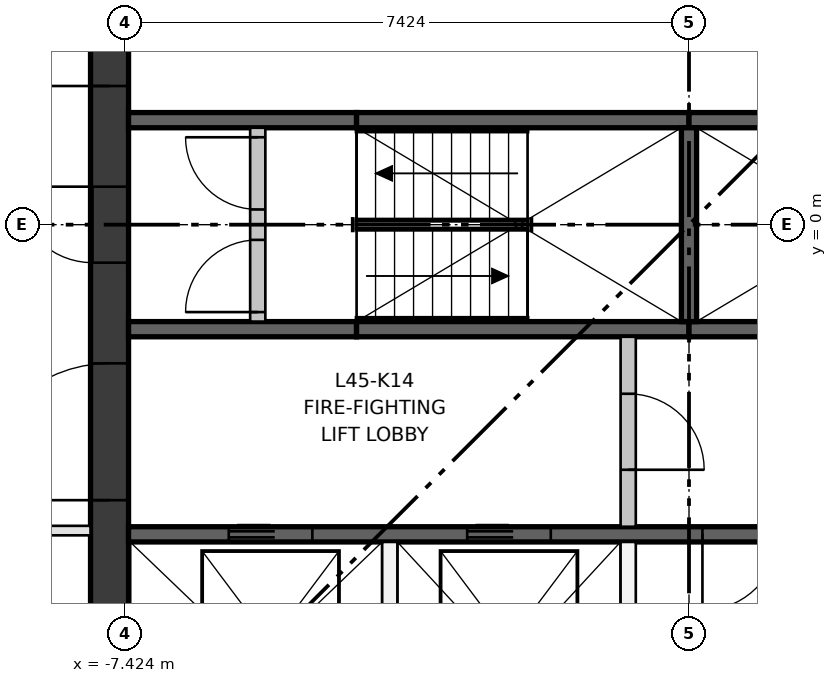
"""IFC4 building model, lengths in metres.
Left out: names, types, materials, properties, quantities, classifications, styles, units other than length and angle.
Written with IfcOpenShell. Run it as: python <this file> out.ifc"""

import sys

from ifc_helpers import new_model, si_unit, direction, frame, frame_2d, origin, place, context, subcontext, project, spatial, rectangle, extrude, element, fill, save


model = new_model("IFC4")
c1 = context("Model", 3, precision=1e-05, world=origin(), true_north=direction((0.0, 1.0)))
c2 = subcontext(c1, "Body", "Model", "MODEL_VIEW")
j1 = project(units=[si_unit("LENGTHUNIT", "METRE"), si_unit("PLANEANGLEUNIT", "RADIAN")], contexts=[c1])
p1 = place(None, origin())
s1 = spatial("IfcSite", under=j1, at=p1, CompositionType="ELEMENT")
p2 = place(p1, origin())
s2 = spatial("IfcBuilding", under=s1, at=p2, CompositionType="ELEMENT")
p3 = place(p2, frame((0.0, 0.0, 170.9)))
s3 = spatial("IfcBuildingStorey", under=s2, at=p3, CompositionType="ELEMENT", Elevation=170.9)
p4 = place(p3, frame((-7.624, -7.374, 0.0), z_axis=(0.0, 0.0, 1.0), x_axis=(0.0, 1.0, 0.0)))
e1 = element("IfcWall", 1, at=p4, inside=s3, PredefinedType="SHEAR", context=c2, shape_type="SweptSolid", body=[
    extrude(rectangle(XDim=14.748, YDim=0.5, at=frame_2d((7.374, 0.0))), origin(), (0.0, 0.0, 1.0), 3.35),
])
p5 = place(p4, frame((6.874, 0.0, 0.0)))
e2 = element("IfcOpeningElement", 2, at=p5, cuts=e1, PredefinedType="OPENING", context=c2, shape_type="SweptSolid", body=[
    extrude(rectangle(XDim=1.0, YDim=2.1, at=frame_2d((0.5, 1.05))), frame((0.0, 0.26, 0.0), z_axis=(0.0, -1.0, 0.0), x_axis=(1.0, 0.0, 0.0)), (0.0, 0.0, 1.0), 0.52),
])
p6 = place(p4, frame((3.75, 0.0, 0.0)))
e3 = element("IfcOpeningElement", 3, at=p6, cuts=e1, PredefinedType="OPENING", context=c2, shape_type="SweptSolid", body=[
    extrude(rectangle(XDim=1.8, YDim=2.1, at=frame_2d((0.9, 1.05))), frame((0.0, 0.26, 0.0), z_axis=(0.0, -1.0, 0.0), x_axis=(1.0, 0.0, 0.0)), (0.0, 0.0, 1.0), 0.52),
])
p7 = place(p4, frame((9.198, 0.0, 0.0)))
e4 = element("IfcOpeningElement", 4, at=p7, cuts=e1, PredefinedType="OPENING", context=c2, shape_type="SweptSolid", body=[
    extrude(rectangle(XDim=1.8, YDim=2.1, at=frame_2d((0.9, 1.05))), frame((0.0, 0.26, 0.0), z_axis=(0.0, -1.0, 0.0), x_axis=(1.0, 0.0, 0.0)), (0.0, 0.0, 1.0), 0.52),
])
p8 = place(p3, frame((-7.374, -4.074, 0.0), z_axis=(0.0, 0.0, 1.0), x_axis=(1.0, 0.0, 0.0)))
e5 = element("IfcWall", 5, at=p8, inside=s3, PredefinedType="SHEAR", context=c2, shape_type="SweptSolid", body=[
    extrude(rectangle(XDim=14.748, YDim=0.2, at=frame_2d((7.374, 0.0))), origin(), (0.0, 0.0, 1.0), 3.0),
])
p9 = place(p8, frame((1.319, 0.0, 0.0)))
e6 = element("IfcOpeningElement", 6, at=p9, cuts=e5, PredefinedType="OPENING", context=c2, shape_type="SweptSolid", body=[
    extrude(rectangle(XDim=1.1, YDim=2.1, at=frame_2d((0.55, 1.05))), frame((0.0, 0.11, 0.0), z_axis=(0.0, -1.0, 0.0), x_axis=(1.0, 0.0, 0.0)), (0.0, 0.0, 1.0), 0.22),
])
p10 = place(p8, frame((4.456, 0.0, 0.0)))
e7 = element("IfcOpeningElement", 7, at=p10, cuts=e5, PredefinedType="OPENING", context=c2, shape_type="SweptSolid", body=[
    extrude(rectangle(XDim=1.1, YDim=2.1, at=frame_2d((0.55, 1.05))), frame((0.0, 0.11, 0.0), z_axis=(0.0, -1.0, 0.0), x_axis=(1.0, 0.0, 0.0)), (0.0, 0.0, 1.0), 0.22),
])
p11 = place(p8, frame((7.551, 0.0, 0.0)))
e8 = element("IfcOpeningElement", 8, at=p11, cuts=e5, PredefinedType="OPENING", context=c2, shape_type="SweptSolid", body=[
    extrude(rectangle(XDim=1.0, YDim=2.1, at=frame_2d((0.5, 1.05))), frame((0.0, 0.11, 0.0), z_axis=(0.0, -1.0, 0.0), x_axis=(1.0, 0.0, 0.0)), (0.0, 0.0, 1.0), 0.22),
])
p12 = place(p8, frame((9.914, 0.0, 0.0)))
e9 = element("IfcOpeningElement", 9, at=p12, cuts=e5, PredefinedType="OPENING", context=c2, shape_type="SweptSolid", body=[
    extrude(rectangle(XDim=1.0, YDim=2.1, at=frame_2d((0.5, 1.05))), frame((0.0, 0.11, 0.0), z_axis=(0.0, -1.0, 0.0), x_axis=(1.0, 0.0, 0.0)), (0.0, 0.0, 1.0), 0.22),
])
p13 = place(p8, frame((11.688, 0.0, 0.0)))
e10 = element("IfcOpeningElement", 10, at=p13, cuts=e5, PredefinedType="OPENING", context=c2, shape_type="SweptSolid", body=[
    extrude(rectangle(XDim=1.0, YDim=2.1, at=frame_2d((0.5, 1.05))), frame((0.0, 0.11, 0.0), z_axis=(0.0, -1.0, 0.0), x_axis=(1.0, 0.0, 0.0)), (0.0, 0.0, 1.0), 0.22),
])
p14 = place(p8, frame((13.461, 0.0, 0.0)))
e11 = element("IfcOpeningElement", 11, at=p14, cuts=e5, PredefinedType="OPENING", context=c2, shape_type="SweptSolid", body=[
    extrude(rectangle(XDim=1.0, YDim=2.1, at=frame_2d((0.5, 1.05))), frame((0.0, 0.11, 0.0), z_axis=(0.0, -1.0, 0.0), x_axis=(1.0, 0.0, 0.0)), (0.0, 0.0, 1.0), 0.22),
])
p15 = place(p3, frame((-7.374, -1.375, 0.0), z_axis=(0.0, 0.0, 1.0), x_axis=(1.0, 0.0, 0.0)))
e12 = element("IfcWall", 12, at=p15, inside=s3, PredefinedType="SHEAR", context=c2, shape_type="SweptSolid", body=[
    extrude(rectangle(XDim=3.0, YDim=0.2, at=frame_2d((1.5, 0.0))), origin(), (0.0, 0.0, 1.0), 3.0),
])
for number, where, z_axis, x_axis in (
    (13, (-4.374, -1.375, 0.0), (0.0, 0.0, 1.0), (1.0, 0.0, 0.0)),
    (14, (0.0, -1.375, 0.0), (0.0, 0.0, 1.0), (1.0, 0.0, 0.0)),
):
    element("IfcWall", number, at=place(p3, frame(where, z_axis=z_axis, x_axis=x_axis)), inside=s3, PredefinedType="SHEAR", context=c2, shape_type="SweptSolid", body=[
        extrude(rectangle(XDim=4.374, YDim=0.2, at=frame_2d((2.187, 0.0))), origin(), (0.0, 0.0, 1.0), 3.0),
    ])
p16 = place(p3, frame((-7.374, 1.375, 0.0), z_axis=(0.0, 0.0, 1.0), x_axis=(1.0, 0.0, 0.0)))
e15 = element("IfcWall", 15, at=p16, inside=s3, PredefinedType="SHEAR", context=c2, shape_type="SweptSolid", body=[
    extrude(rectangle(XDim=3.0, YDim=0.2, at=frame_2d((1.5, 0.0))), origin(), (0.0, 0.0, 1.0), 3.0),
])
for number, where, z_axis, x_axis in (
    (16, (-4.374, 1.375, 0.0), (0.0, 0.0, 1.0), (1.0, 0.0, 0.0)),
    (17, (0.0, 1.375, 0.0), (0.0, 0.0, 1.0), (1.0, 0.0, 0.0)),
):
    element("IfcWall", number, at=place(p3, frame(where, z_axis=z_axis, x_axis=x_axis)), inside=s3, PredefinedType="SHEAR", context=c2, shape_type="SweptSolid", body=[
        extrude(rectangle(XDim=4.374, YDim=0.2, at=frame_2d((2.187, 0.0))), origin(), (0.0, 0.0, 1.0), 3.0),
    ])
p17 = place(p3, frame((0.0, -1.275, 0.0), z_axis=(0.0, 0.0, 1.0), x_axis=(0.0, 1.0, 0.0)))
e18 = element("IfcWall", 18, at=p17, inside=s3, PredefinedType="SHEAR", context=c2, shape_type="SweptSolid", body=[
    extrude(rectangle(XDim=2.55, YDim=0.2, at=frame_2d((1.275, 0.0))), origin(), (0.0, 0.0, 1.0), 3.0),
])
for number, where, z_axis, x_axis in (
    (19, (-3.937, -7.374, 0.0), (0.0, 0.0, 1.0), (0.0, 1.0, 0.0)),
    (20, (-0.8, -7.374, 0.0), (0.0, 0.0, 1.0), (0.0, 1.0, 0.0)),
):
    element("IfcWall", number, at=place(p3, frame(where, z_axis=z_axis, x_axis=x_axis)), inside=s3, PredefinedType="PARTITIONING", context=c2, shape_type="SweptSolid", body=[
        extrude(rectangle(XDim=3.2, YDim=0.2, at=frame_2d((1.6, 0.0))), origin(), (0.0, 0.0, 1.0), 3.0),
    ])
p18 = place(p3, frame((-0.8, -3.974, 0.0), z_axis=(0.0, 0.0, 1.0), x_axis=(0.0, 1.0, 0.0)))
e21 = element("IfcWall", 21, at=p18, inside=s3, PredefinedType="PARTITIONING", context=c2, shape_type="SweptSolid", body=[
    extrude(rectangle(XDim=2.499, YDim=0.2, at=frame_2d((1.25, 0.0))), origin(), (0.0, 0.0, 1.0), 3.0),
])
p19 = place(p18, frame((0.75, 0.0, 0.0)))
e22 = element("IfcOpeningElement", 22, at=p19, cuts=e21, PredefinedType="OPENING", context=c2, shape_type="SweptSolid", body=[
    extrude(rectangle(XDim=1.0, YDim=2.1, at=frame_2d((0.5, 1.05))), frame((0.0, 0.11, 0.0), z_axis=(0.0, -1.0, 0.0), x_axis=(1.0, 0.0, 0.0)), (0.0, 0.0, 1.0), 0.22),
])
p20 = place(p3, frame((-5.674, -1.275, 0.0), z_axis=(0.0, 0.0, 1.0), x_axis=(0.0, 1.0, 0.0)))
e23 = element("IfcWall", 23, at=p20, inside=s3, PredefinedType="PARTITIONING", context=c2, shape_type="SweptSolid", body=[
    extrude(rectangle(XDim=2.55, YDim=0.2, at=frame_2d((1.275, 0.0))), origin(), (0.0, 0.0, 1.0), 3.0),
])
p21 = place(p20, frame((0.125, 0.0, 0.0)))
e24 = element("IfcOpeningElement", 24, at=p21, cuts=e23, PredefinedType="OPENING", context=c2, shape_type="SweptSolid", body=[
    extrude(rectangle(XDim=0.95, YDim=2.1, at=frame_2d((0.475, 1.05))), frame((0.0, 0.11, 0.0), z_axis=(0.0, -1.0, 0.0), x_axis=(1.0, 0.0, 0.0)), (0.0, 0.0, 1.0), 0.22),
])
p22 = place(p20, frame((1.475, 0.0, 0.0)))
e25 = element("IfcOpeningElement", 25, at=p22, cuts=e23, PredefinedType="OPENING", context=c2, shape_type="SweptSolid", body=[
    extrude(rectangle(XDim=0.95, YDim=2.1, at=frame_2d((0.475, 1.05))), frame((0.0, 0.11, 0.0), z_axis=(0.0, -1.0, 0.0), x_axis=(1.0, 0.0, 0.0)), (0.0, 0.0, 1.0), 0.22),
])
p23 = place(p3, frame((-7.874, -4.024, 0.0), z_axis=(0.0, 0.0, 1.0), x_axis=(-1.0, 0.0, 0.0)))
e26 = element("IfcWall", 26, at=p23, inside=s3, PredefinedType="PARTITIONING", context=c2, shape_type="SweptSolid", body=[
    extrude(rectangle(XDim=4.53, YDim=0.125, at=frame_2d((2.265, 0.0))), origin(), (0.0, 0.0, 1.0), 3.0),
])
p24 = place(p23, frame((1.0, 0.0, 0.0)))
e27 = element("IfcOpeningElement", 27, at=p24, cuts=e26, PredefinedType="OPENING", context=c2, shape_type="SweptSolid", body=[
    extrude(rectangle(XDim=1.8, YDim=2.1, at=frame_2d((0.9, 1.05))), frame((0.0, 0.073, 0.0), z_axis=(0.0, -1.0, 0.0), x_axis=(1.0, 0.0, 0.0)), (0.0, 0.0, 1.0), 0.145),
])
p25 = place(p9, origin())
e28 = element("IfcDoor", 28, at=p25, inside=s3, OperationType="DOUBLE_DOOR_SLIDING", PredefinedType="DOOR", context=c2, shape_type="SweptSolid", body=[
    extrude(rectangle(XDim=1.1, YDim=2.1, at=frame_2d((0.55, 1.05))), frame((0.0, 0.025, 0.0), z_axis=(0.0, -1.0, 0.0), x_axis=(1.0, 0.0, 0.0)), (0.0, 0.0, 1.0), 0.05),
])
fill(e6, e28)
p26 = place(p10, origin())
e29 = element("IfcDoor", 29, at=p26, inside=s3, OperationType="DOUBLE_DOOR_SLIDING", PredefinedType="DOOR", context=c2, shape_type="SweptSolid", body=[
    extrude(rectangle(XDim=1.1, YDim=2.1, at=frame_2d((0.55, 1.05))), frame((0.0, 0.025, 0.0), z_axis=(0.0, -1.0, 0.0), x_axis=(1.0, 0.0, 0.0)), (0.0, 0.0, 1.0), 0.05),
])
fill(e7, e29)
p27 = place(p21, origin())
e30 = element("IfcDoor", 30, at=p27, inside=s3, OperationType="SINGLE_SWING_LEFT", PredefinedType="DOOR", context=c2, shape_type="SweptSolid", body=[
    extrude(rectangle(XDim=0.95, YDim=2.1, at=frame_2d((0.475, 1.05))), frame((0.0, 0.025, 0.0), z_axis=(0.0, -1.0, 0.0), x_axis=(1.0, 0.0, 0.0)), (0.0, 0.0, 1.0), 0.05),
])
fill(e24, e30)
p28 = place(p22, origin())
e31 = element("IfcDoor", 31, at=p28, inside=s3, OperationType="SINGLE_SWING_RIGHT", PredefinedType="DOOR", context=c2, shape_type="SweptSolid", body=[
    extrude(rectangle(XDim=0.95, YDim=2.1, at=frame_2d((0.475, 1.05))), frame((0.0, 0.025, 0.0), z_axis=(0.0, -1.0, 0.0), x_axis=(1.0, 0.0, 0.0)), (0.0, 0.0, 1.0), 0.05),
])
fill(e25, e31)
p29 = place(p19, frame((1.0, 0.0, 0.0), z_axis=(0.0, 0.0, 1.0), x_axis=(-1.0, 0.0, 0.0)))
e32 = element("IfcDoor", 32, at=p29, inside=s3, OperationType="SINGLE_SWING_LEFT", PredefinedType="DOOR", context=c2, shape_type="SweptSolid", body=[
    extrude(rectangle(XDim=1.0, YDim=2.1, at=frame_2d((0.5, 1.05))), frame((0.0, 0.025, 0.0), z_axis=(0.0, -1.0, 0.0), x_axis=(1.0, 0.0, 0.0)), (0.0, 0.0, 1.0), 0.05),
])
fill(e22, e32)
p30 = place(p11, frame((1.0, 0.0, 0.0), z_axis=(0.0, 0.0, 1.0), x_axis=(-1.0, 0.0, 0.0)))
e33 = element("IfcDoor", 33, at=p30, inside=s3, OperationType="SINGLE_SWING_LEFT", PredefinedType="DOOR", context=c2, shape_type="SweptSolid", body=[
    extrude(rectangle(XDim=1.0, YDim=2.1, at=frame_2d((0.5, 1.05))), frame((0.0, 0.025, 0.0), z_axis=(0.0, -1.0, 0.0), x_axis=(1.0, 0.0, 0.0)), (0.0, 0.0, 1.0), 0.05),
])
fill(e8, e33)
p31 = place(p5, origin())
e34 = element("IfcDoor", 34, at=p31, inside=s3, OperationType="SINGLE_SWING_RIGHT", PredefinedType="DOOR", context=c2, shape_type="SweptSolid", body=[
    extrude(rectangle(XDim=1.0, YDim=2.1, at=frame_2d((0.5, 1.05))), frame((0.0, 0.25, 0.0), z_axis=(0.0, -1.0, 0.0), x_axis=(1.0, 0.0, 0.0)), (0.0, 0.0, 1.0), 0.05),
])
fill(e2, e34)
p32 = place(p6, origin())
e35 = element("IfcDoor", 35, at=p32, inside=s3, OperationType="DOUBLE_DOOR_SINGLE_SWING", PredefinedType="DOOR", context=c2, shape_type="SweptSolid", body=[
    extrude(rectangle(XDim=1.8, YDim=2.1, at=frame_2d((0.9, 1.05))), frame((0.0, 0.025, 0.0), z_axis=(0.0, -1.0, 0.0), x_axis=(1.0, 0.0, 0.0)), (0.0, 0.0, 1.0), 0.05),
])
fill(e3, e35)
p33 = place(p7, origin())
e36 = element("IfcDoor", 36, at=p33, inside=s3, OperationType="DOUBLE_DOOR_SINGLE_SWING", PredefinedType="DOOR", context=c2, shape_type="SweptSolid", body=[
    extrude(rectangle(XDim=1.8, YDim=2.1, at=frame_2d((0.9, 1.05))), frame((0.0, 0.025, 0.0), z_axis=(0.0, -1.0, 0.0), x_axis=(1.0, 0.0, 0.0)), (0.0, 0.0, 1.0), 0.05),
])
fill(e4, e36)
save(model, sys.argv[1])
